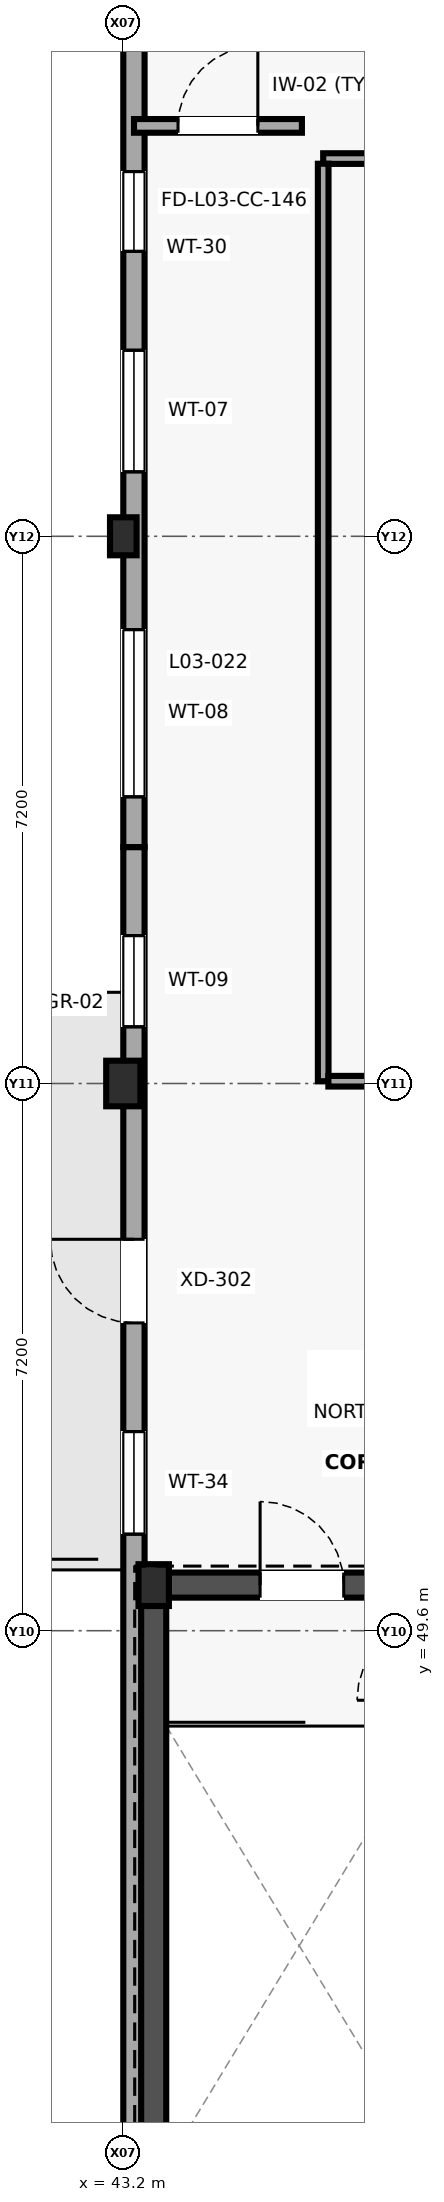
"""IFC4 building model, lengths in metres.
Left out: names, types, materials, properties, quantities, classifications, styles, units other than length and angle.
Written with IfcOpenShell. Run it as: python <this file> out.ifc"""

import sys

from ifc_helpers import new_model, si_unit, direction, frame, frame_2d, origin, origin_2d, place, context, subcontext, project, spatial, rectangle, extrude, element, fill, save


model = new_model("IFC4")
c1 = context("Model", 3, precision=1e-05, world=origin(), true_north=direction((0.0, 1.0)))
c2 = subcontext(c1, "Body", "Model", "MODEL_VIEW")
j1 = project(units=[si_unit("LENGTHUNIT", "METRE"), si_unit("PLANEANGLEUNIT", "RADIAN")], contexts=[c1])
p1 = place(None, origin())
s1 = spatial("IfcSite", under=j1, at=p1, CompositionType="ELEMENT")
p2 = place(p1, origin())
s2 = spatial("IfcBuilding", under=s1, at=p2, CompositionType="ELEMENT")
p3 = place(p2, frame((0.0, 0.0, 12.2)))
s3 = spatial("IfcBuildingStorey", under=s2, at=p3, CompositionType="ELEMENT", Elevation=12.2)
p4 = place(p3, frame((43.2, 56.8, 0.0), z_axis=(0.0, 0.0, 1.0), x_axis=(1.0, 0.0, 0.0)))
e1 = element("IfcColumn", 1, at=p4, inside=s3, PredefinedType="COLUMN", context=c2, shape_type="SweptSolid", body=[
    extrude(rectangle(XDim=0.45, YDim=0.6, at=origin_2d()), origin(), (0.0, 0.0, 1.0), 4.0),
])
p5 = place(p3, frame((43.2, 64.0, 0.0), z_axis=(0.0, 0.0, 1.0), x_axis=(1.0, 0.0, 0.0)))
e2 = element("IfcColumn", 2, at=p5, inside=s3, PredefinedType="PILASTER", context=c2, shape_type="SweptSolid", body=[
    extrude(rectangle(XDim=0.35, YDim=0.5, at=origin_2d()), origin(), (0.0, 0.0, 1.0), 4.0),
])
p6 = place(p3, frame((43.6, 50.2, 0.0), z_axis=(0.0, 0.0, 1.0), x_axis=(1.0, 0.0, 0.0)))
e3 = element("IfcColumn", 3, at=p6, inside=s3, PredefinedType="COLUMN", context=c2, shape_type="SweptSolid", body=[
    extrude(rectangle(XDim=0.4, YDim=0.55, at=origin_2d()), origin(), (0.0, 0.0, 1.0), 4.0),
])
p7 = place(p3, frame((43.34, 77.538, 0.0), z_axis=(0.0, 0.0, 1.0), x_axis=(0.0, -1.0, 0.0)))
e4 = element("IfcWall", 4, at=p7, inside=s3, PredefinedType="SOLIDWALL", context=c2, shape_type="SweptSolid", body=[
    extrude(rectangle(XDim=17.629, YDim=0.28, at=frame_2d((8.814, 0.0))), origin(), (0.0, 0.0, 1.0), 3.205),
])
p8 = place(p7, frame((0.36, 0.0, 1.05)))
e5 = element("IfcOpeningElement", 5, at=p8, cuts=e4, PredefinedType="OPENING", context=c2, shape_type="SweptSolid", body=[
    extrude(rectangle(XDim=2.3, YDim=1.45, at=frame_2d((1.15, 0.725))), frame((0.0, 0.15, 0.0), z_axis=(0.0, -1.0, 0.0), x_axis=(1.0, 0.0, 0.0)), (0.0, 0.0, 1.0), 0.3),
])
p9 = place(p7, frame((3.864, 0.0, 1.05)))
e6 = element("IfcOpeningElement", 6, at=p9, cuts=e4, PredefinedType="OPENING", context=c2, shape_type="SweptSolid", body=[
    extrude(rectangle(XDim=1.15, YDim=1.4, at=frame_2d((0.575, 0.7))), frame((0.0, 0.15, 0.0), z_axis=(0.0, -1.0, 0.0), x_axis=(1.0, 0.0, 0.0)), (0.0, 0.0, 1.0), 0.3),
])
p10 = place(p7, frame((8.739, 0.0, 1.05)))
e7 = element("IfcOpeningElement", 7, at=p10, cuts=e4, PredefinedType="OPENING", context=c2, shape_type="SweptSolid", body=[
    extrude(rectangle(XDim=1.05, YDim=1.3, at=frame_2d((0.525, 0.65))), frame((0.0, 0.15, 0.0), z_axis=(0.0, -1.0, 0.0), x_axis=(1.0, 0.0, 0.0)), (0.0, 0.0, 1.0), 0.3),
])
p11 = place(p7, frame((11.09, 0.0, 1.05)))
e8 = element("IfcOpeningElement", 8, at=p11, cuts=e4, PredefinedType="OPENING", context=c2, shape_type="SweptSolid", body=[
    extrude(rectangle(XDim=1.6, YDim=1.35, at=frame_2d((0.8, 0.675))), frame((0.0, 0.15, 0.0), z_axis=(0.0, -1.0, 0.0), x_axis=(1.0, 0.0, 0.0)), (0.0, 0.0, 1.0), 0.3),
])
p12 = place(p7, frame((14.766, 0.0, 1.05)))
e9 = element("IfcOpeningElement", 9, at=p12, cuts=e4, PredefinedType="OPENING", context=c2, shape_type="SweptSolid", body=[
    extrude(rectangle(XDim=2.2, YDim=1.35, at=frame_2d((1.1, 0.675))), frame((0.0, 0.15, 0.0), z_axis=(0.0, -1.0, 0.0), x_axis=(1.0, 0.0, 0.0)), (0.0, 0.0, 1.0), 0.3),
])
p13 = place(p3, frame((43.34, 59.909, 0.0), z_axis=(0.0, 0.0, 1.0), x_axis=(0.0, -1.0, 0.0)))
e10 = element("IfcWall", 10, at=p13, inside=s3, PredefinedType="SOLIDWALL", context=c2, shape_type="SweptSolid", body=[
    extrude(rectangle(XDim=17.629, YDim=0.28, at=frame_2d((8.814, 0.0))), origin(), (0.0, 0.0, 1.0), 3.205),
])
p14 = place(p13, frame((5.159, 0.0, 0.0)))
e11 = element("IfcOpeningElement", 11, at=p14, cuts=e10, PredefinedType="OPENING", context=c2, shape_type="SweptSolid", body=[
    extrude(rectangle(XDim=1.1, YDim=2.15, at=frame_2d((0.55, 1.075))), frame((0.0, 0.15, 0.0), z_axis=(0.0, -1.0, 0.0), x_axis=(1.0, 0.0, 0.0)), (0.0, 0.0, 1.0), 0.3),
])
p15 = place(p13, frame((1.163, 0.0, 1.05)))
e12 = element("IfcOpeningElement", 12, at=p15, cuts=e10, PredefinedType="OPENING", context=c2, shape_type="SweptSolid", body=[
    extrude(rectangle(XDim=1.2, YDim=0.9, at=frame_2d((0.6, 0.45))), frame((0.0, 0.15, 0.0), z_axis=(0.0, -1.0, 0.0), x_axis=(1.0, 0.0, 0.0)), (0.0, 0.0, 1.0), 0.3),
])
p16 = place(p13, frame((7.689, 0.0, 1.05)))
e13 = element("IfcOpeningElement", 13, at=p16, cuts=e10, PredefinedType="OPENING", context=c2, shape_type="SweptSolid", body=[
    extrude(rectangle(XDim=1.35, YDim=1.2, at=frame_2d((0.675, 0.6))), frame((0.0, 0.15, 0.0), z_axis=(0.0, -1.0, 0.0), x_axis=(1.0, 0.0, 0.0)), (0.0, 0.0, 1.0), 0.3),
])
p17 = place(p3, frame((43.435, 50.2, 0.0), z_axis=(0.0, 0.0, 1.0), x_axis=(1.0, 0.0, 0.0)))
e14 = element("IfcWall", 14, at=p17, inside=s3, PredefinedType="SHEAR", context=c2, shape_type="SweptSolid", body=[
    extrude(rectangle(XDim=7.53, YDim=0.33, at=frame_2d((3.765, 0.0))), origin(), (0.0, 0.0, 1.0), 4.0),
])
p18 = place(p17, frame((5.015, 0.0, 0.0)))
e15 = element("IfcOpeningElement", 15, at=p18, cuts=e14, PredefinedType="OPENING", context=c2, shape_type="SweptSolid", body=[
    extrude(rectangle(XDim=1.05, YDim=2.15, at=frame_2d((0.525, 1.075))), frame((0.0, 0.175, 0.0), z_axis=(0.0, -1.0, 0.0), x_axis=(1.0, 0.0, 0.0)), (0.0, 0.0, 1.0), 0.35),
])
p19 = place(p17, frame((1.565, 0.0, 0.0)))
e16 = element("IfcOpeningElement", 16, at=p19, cuts=e14, PredefinedType="OPENING", context=c2, shape_type="SweptSolid", body=[
    extrude(rectangle(XDim=1.1, YDim=2.15, at=frame_2d((0.55, 1.075))), frame((0.0, 0.175, 0.0), z_axis=(0.0, -1.0, 0.0), x_axis=(1.0, 0.0, 0.0)), (0.0, 0.0, 1.0), 0.35),
])
p20 = place(p3, frame((43.6, 42.565, 0.0), z_axis=(0.0, 0.0, 1.0), x_axis=(0.0, 1.0, 0.0)))
e17 = element("IfcWall", 17, at=p20, inside=s3, PredefinedType="SHEAR", context=c2, shape_type="SweptSolid", body=[
    extrude(rectangle(XDim=7.47, YDim=0.33, at=frame_2d((3.735, 0.0))), origin(), (0.0, 0.0, 1.0), 4.0),
])
p21 = place(p3, frame((43.341, 69.4, 0.0), z_axis=(0.0, 0.0, 1.0), x_axis=(1.0, 0.0, 0.0)))
e18 = element("IfcWall", 18, at=p21, inside=s3, PredefinedType="PARTITIONING", context=c2, shape_type="SweptSolid", body=[
    extrude(rectangle(XDim=2.209, YDim=0.18, at=frame_2d((1.104, 0.0))), origin(), (0.0, 0.0, 1.0), 3.78),
])
p22 = place(p21, frame((0.579, 0.0, 0.0)))
e19 = element("IfcOpeningElement", 19, at=p22, cuts=e18, PredefinedType="OPENING", context=c2, shape_type="SweptSolid", body=[
    extrude(rectangle(XDim=1.05, YDim=2.15, at=frame_2d((0.525, 1.075))), frame((0.0, 0.1, 0.0), z_axis=(0.0, -1.0, 0.0), x_axis=(1.0, 0.0, 0.0)), (0.0, 0.0, 1.0), 0.2),
])
p23 = place(p3, frame((63.37, 68.97, 0.0), z_axis=(0.0, 0.0, 1.0), x_axis=(-1.0, 0.0, 0.0)))
e20 = element("IfcWall", 20, at=p23, inside=s3, PredefinedType="PARTITIONING", context=c2, shape_type="SweptSolid", body=[
    extrude(rectangle(XDim=17.54, YDim=0.14, at=frame_2d((8.77, 0.0))), origin(), (0.0, 0.0, 1.0), 3.755),
])
p24 = place(p23, frame((8.28, 0.0, 0.0)))
e21 = element("IfcOpeningElement", 21, at=p24, cuts=e20, PredefinedType="OPENING", context=c2, shape_type="SweptSolid", body=[
    extrude(rectangle(XDim=0.98, YDim=2.12, at=frame_2d((0.49, 1.06))), frame((0.0, 0.08, 0.0), z_axis=(0.0, -1.0, 0.0), x_axis=(1.0, 0.0, 0.0)), (0.0, 0.0, 1.0), 0.16),
])
p25 = place(p23, frame((9.96, 0.0, 1.05)))
e22 = element("IfcOpeningElement", 22, at=p25, cuts=e20, PredefinedType="OPENING", context=c2, shape_type="SweptSolid", body=[
    extrude(rectangle(XDim=1.4, YDim=1.05, at=frame_2d((0.7, 0.525))), frame((0.0, 0.08, 0.0), z_axis=(0.0, -1.0, 0.0), x_axis=(1.0, 0.0, 0.0)), (0.0, 0.0, 1.0), 0.16),
])
p26 = place(p3, frame((45.83, 68.902, 0.0), z_axis=(0.0, 0.0, 1.0), x_axis=(0.0, -1.0, 0.0)))
e23 = element("IfcWall", 23, at=p26, inside=s3, PredefinedType="PARTITIONING", context=c2, shape_type="SweptSolid", body=[
    extrude(rectangle(XDim=12.072, YDim=0.14, at=frame_2d((6.036, 0.0))), origin(), (0.0, 0.0, 1.0), 3.155),
])
p27 = place(p3, frame((45.898, 56.83, 0.0), z_axis=(0.0, 0.0, 1.0), x_axis=(1.0, 0.0, 0.0)))
e24 = element("IfcWall", 24, at=p27, inside=s3, PredefinedType="PARTITIONING", context=c2, shape_type="SweptSolid", body=[
    extrude(rectangle(XDim=5.532, YDim=0.14, at=frame_2d((2.766, 0.0))), origin(), (0.0, 0.0, 1.0), 3.005),
])
p28 = place(p14, frame((1.1, 0.0, 0.0), z_axis=(0.0, 0.0, 1.0), x_axis=(-1.0, 0.0, 0.0)))
e25 = element("IfcDoor", 25, at=p28, inside=s3, OperationType="SINGLE_SWING_LEFT", PredefinedType="DOOR", context=c2, shape_type="SweptSolid", body=[
    extrude(rectangle(XDim=1.1, YDim=2.15, at=frame_2d((0.55, 1.075))), frame((0.0, 0.025, 0.0), z_axis=(0.0, -1.0, 0.0), x_axis=(1.0, 0.0, 0.0)), (0.0, 0.0, 1.0), 0.05),
])
fill(e11, e25)
p29 = place(p10, origin())
e26 = element("IfcWindow", 26, at=p29, inside=s3, PartitioningType="SINGLE_PANEL", PredefinedType="WINDOW", context=c2, shape_type="SweptSolid", body=[
    extrude(rectangle(XDim=1.05, YDim=1.3, at=frame_2d((0.525, 0.65))), frame((0.0, 0.03, 0.0), z_axis=(0.0, -1.0, 0.0), x_axis=(1.0, 0.0, 0.0)), (0.0, 0.0, 1.0), 0.06),
])
fill(e7, e26)
p30 = place(p11, origin())
e27 = element("IfcWindow", 27, at=p30, inside=s3, PartitioningType="SINGLE_PANEL", PredefinedType="WINDOW", context=c2, shape_type="SweptSolid", body=[
    extrude(rectangle(XDim=1.6, YDim=1.35, at=frame_2d((0.8, 0.675))), frame((0.0, 0.03, 0.0), z_axis=(0.0, -1.0, 0.0), x_axis=(1.0, 0.0, 0.0)), (0.0, 0.0, 1.0), 0.06),
])
fill(e8, e27)
p31 = place(p12, origin())
e28 = element("IfcWindow", 28, at=p31, inside=s3, PartitioningType="SINGLE_PANEL", PredefinedType="WINDOW", context=c2, shape_type="SweptSolid", body=[
    extrude(rectangle(XDim=2.2, YDim=1.35, at=frame_2d((1.1, 0.675))), frame((0.0, 0.03, 0.0), z_axis=(0.0, -1.0, 0.0), x_axis=(1.0, 0.0, 0.0)), (0.0, 0.0, 1.0), 0.06),
])
fill(e9, e28)
p32 = place(p15, origin())
e29 = element("IfcWindow", 29, at=p32, inside=s3, PartitioningType="SINGLE_PANEL", PredefinedType="WINDOW", context=c2, shape_type="SweptSolid", body=[
    extrude(rectangle(XDim=1.2, YDim=0.9, at=frame_2d((0.6, 0.45))), frame((0.0, 0.03, 0.0), z_axis=(0.0, -1.0, 0.0), x_axis=(1.0, 0.0, 0.0)), (0.0, 0.0, 1.0), 0.06),
])
fill(e12, e29)
p33 = place(p16, origin())
e30 = element("IfcWindow", 30, at=p33, inside=s3, PartitioningType="SINGLE_PANEL", PredefinedType="WINDOW", context=c2, shape_type="SweptSolid", body=[
    extrude(rectangle(XDim=1.35, YDim=1.2, at=frame_2d((0.675, 0.6))), frame((0.0, 0.03, 0.0), z_axis=(0.0, -1.0, 0.0), x_axis=(1.0, 0.0, 0.0)), (0.0, 0.0, 1.0), 0.06),
])
fill(e13, e30)
p34 = place(p19, origin())
e31 = element("IfcDoor", 31, at=p34, inside=s3, OperationType="SINGLE_SWING_LEFT", PredefinedType="DOOR", context=c2, shape_type="SweptSolid", body=[
    extrude(rectangle(XDim=1.1, YDim=2.15, at=frame_2d((0.55, 1.075))), frame((0.0, 0.025, 0.0), z_axis=(0.0, -1.0, 0.0), x_axis=(1.0, 0.0, 0.0)), (0.0, 0.0, 1.0), 0.05),
])
fill(e16, e31)
p35 = place(p22, origin())
e32 = element("IfcDoor", 32, at=p35, inside=s3, OperationType="SINGLE_SWING_RIGHT", PredefinedType="DOOR", context=c2, shape_type="SweptSolid", body=[
    extrude(rectangle(XDim=1.05, YDim=2.15, at=frame_2d((0.525, 1.075))), frame((0.0, 0.025, 0.0), z_axis=(0.0, -1.0, 0.0), x_axis=(1.0, 0.0, 0.0)), (0.0, 0.0, 1.0), 0.05),
])
fill(e19, e32)
save(model, sys.argv[1])
